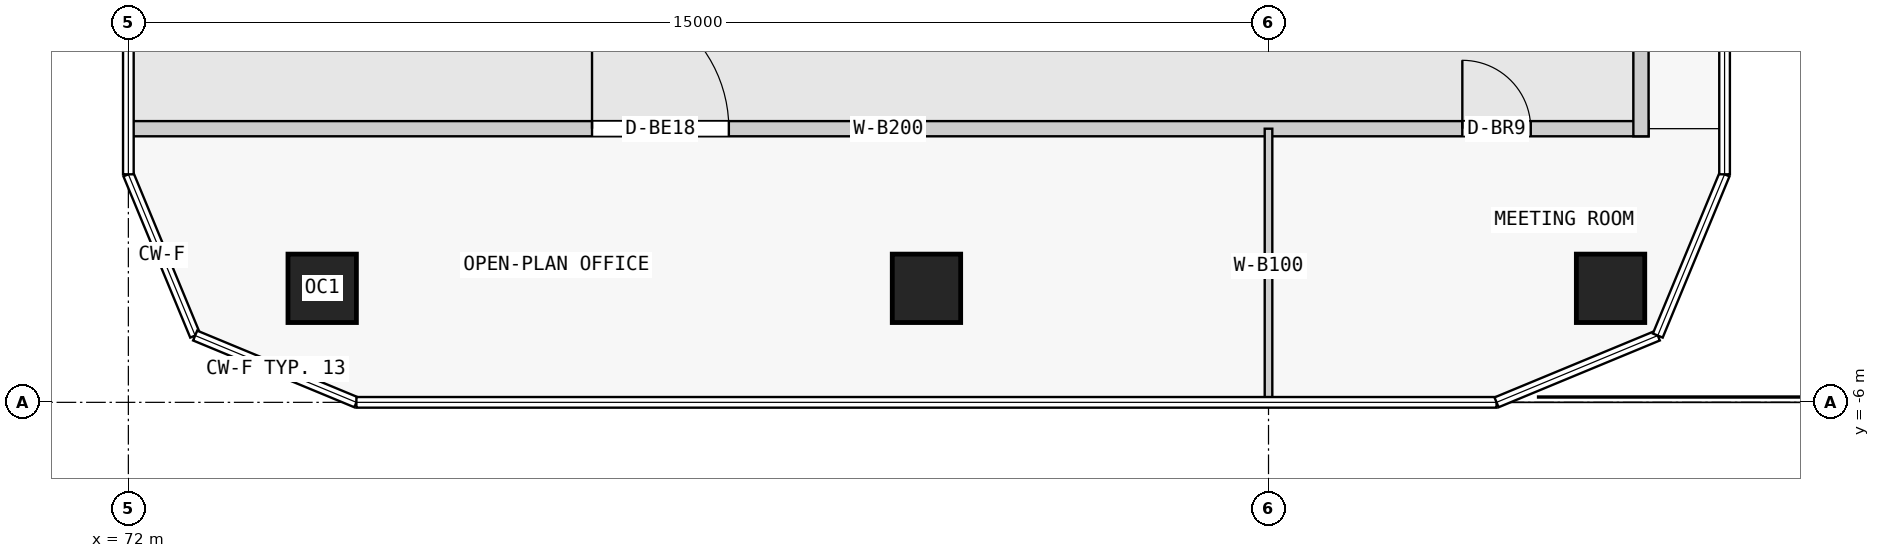
"""IFC4 building model, lengths in metres.
Left out: names, types, materials, properties, quantities, classifications, styles, units other than length and angle.
Written with IfcOpenShell. Run it as: python <this file> out.ifc"""

import sys

from ifc_helpers import new_model, si_unit, direction, frame, frame_2d, origin, origin_2d, place, context, subcontext, project, spatial, rectangle, extrude, element, fill, save


model = new_model("IFC4")
c1 = context("Model", 3, precision=1e-05, world=origin(), true_north=direction((0.0, 1.0)))
c2 = subcontext(c1, "Body", "Model", "MODEL_VIEW")
j1 = project(units=[si_unit("LENGTHUNIT", "METRE"), si_unit("PLANEANGLEUNIT", "RADIAN")], contexts=[c1])
p1 = place(None, origin())
s1 = spatial("IfcSite", under=j1, at=p1, CompositionType="ELEMENT")
p2 = place(p1, origin())
s2 = spatial("IfcBuilding", under=s1, at=p2, CompositionType="ELEMENT")
p3 = place(p2, frame((0.0, 0.0, 116.8)))
s3 = spatial("IfcBuildingStorey", under=s2, at=p3, CompositionType="ELEMENT", Elevation=116.8)
for number, where, z_axis, x_axis in (
    (1, (74.55, -4.5, 0.0), (0.0, 0.0, 1.0), (1.0, 0.0, 0.0)),
    (2, (82.5, -4.5, 0.0), (0.0, 0.0, 1.0), (1.0, 0.0, 0.0)),
    (3, (91.5, -4.5, 0.0), (0.0, 0.0, 1.0), (1.0, 0.0, 0.0)),
):
    element("IfcColumn", number, at=place(p3, frame(where, z_axis=z_axis, x_axis=x_axis)), inside=s3, PredefinedType="COLUMN", context=c2, shape_type="SweptSolid", body=[
        extrude(rectangle(XDim=0.9, YDim=0.9, at=origin_2d()), origin(), (0.0, 0.0, 1.0), 3.5),
    ])
p4 = place(p3, frame((72.0, -2.4, 0.0), z_axis=(0.0, 0.0, 1.0), x_axis=(1.0, 0.0, 0.0)))
e4 = element("IfcWall", 4, at=p4, inside=s3, PredefinedType="PARTITIONING", context=c2, shape_type="SweptSolid", body=[
    extrude(rectangle(XDim=20.0, YDim=0.2, at=frame_2d((10.0, 0.0))), origin(), (0.0, 0.0, 1.0), 3.25),
])
p5 = place(p4, frame((6.1, 0.0, 0.0)))
e5 = element("IfcOpeningElement", 5, at=p5, cuts=e4, PredefinedType="OPENING", context=c2, shape_type="SweptSolid", body=[
    extrude(rectangle(XDim=1.8, YDim=2.1, at=frame_2d((0.9, 1.05))), frame((0.0, 0.11, 0.0), z_axis=(0.0, -1.0, 0.0), x_axis=(1.0, 0.0, 0.0)), (0.0, 0.0, 1.0), 0.22),
])
p6 = place(p4, frame((17.55, 0.0, 0.0)))
e6 = element("IfcOpeningElement", 6, at=p6, cuts=e4, PredefinedType="OPENING", context=c2, shape_type="SweptSolid", body=[
    extrude(rectangle(XDim=0.9, YDim=2.1, at=frame_2d((0.45, 1.05))), frame((0.0, 0.11, 0.0), z_axis=(0.0, -1.0, 0.0), x_axis=(1.0, 0.0, 0.0)), (0.0, 0.0, 1.0), 0.22),
])
p7 = place(p3, frame((91.9, -2.5, 0.0), z_axis=(0.0, 0.0, 1.0), x_axis=(0.0, 1.0, 0.0)))
e7 = element("IfcWall", 7, at=p7, inside=s3, PredefinedType="PARTITIONING", context=c2, shape_type="SweptSolid", body=[
    extrude(rectangle(XDim=23.0, YDim=0.2, at=frame_2d((11.5, 0.0))), origin(), (0.0, 0.0, 1.0), 3.25),
])
p8 = place(p7, frame((10.7, 0.0, 0.0)))
e8 = element("IfcOpeningElement", 8, at=p8, cuts=e7, PredefinedType="OPENING", context=c2, shape_type="SweptSolid", body=[
    extrude(rectangle(XDim=1.8, YDim=2.1, at=frame_2d((0.9, 1.05))), frame((0.0, 0.11, 0.0), z_axis=(0.0, -1.0, 0.0), x_axis=(1.0, 0.0, 0.0)), (0.0, 0.0, 1.0), 0.22),
])
p9 = place(p3, frame((87.0, -6.0, 0.0), z_axis=(0.0, 0.0, 1.0), x_axis=(0.0, 1.0, 0.0)))
e9 = element("IfcWall", 9, at=p9, inside=s3, PredefinedType="PARTITIONING", context=c2, shape_type="SweptSolid", body=[
    extrude(rectangle(XDim=3.6, YDim=0.1, at=frame_2d((1.8, 0.0))), origin(), (0.0, 0.0, 1.0), 3.25),
])
p10 = place(p5, origin())
e10 = element("IfcDoor", 10, at=p10, inside=s3, OperationType="DOUBLE_DOOR_SINGLE_SWING", PredefinedType="DOOR", context=c2, shape_type="SweptSolid", body=[
    extrude(rectangle(XDim=1.8, YDim=2.1, at=frame_2d((0.9, 1.05))), frame((0.0, 0.025, 0.0), z_axis=(0.0, -1.0, 0.0), x_axis=(1.0, 0.0, 0.0)), (0.0, 0.0, 1.0), 0.05),
])
fill(e5, e10)
p11 = place(p6, origin())
e11 = element("IfcDoor", 11, at=p11, inside=s3, OperationType="SINGLE_SWING_LEFT", PredefinedType="DOOR", context=c2, shape_type="SweptSolid", body=[
    extrude(rectangle(XDim=0.9, YDim=2.1, at=frame_2d((0.45, 1.05))), frame((0.0, 0.025, 0.0), z_axis=(0.0, -1.0, 0.0), x_axis=(1.0, 0.0, 0.0)), (0.0, 0.0, 1.0), 0.05),
])
fill(e6, e11)
save(model, sys.argv[1])
